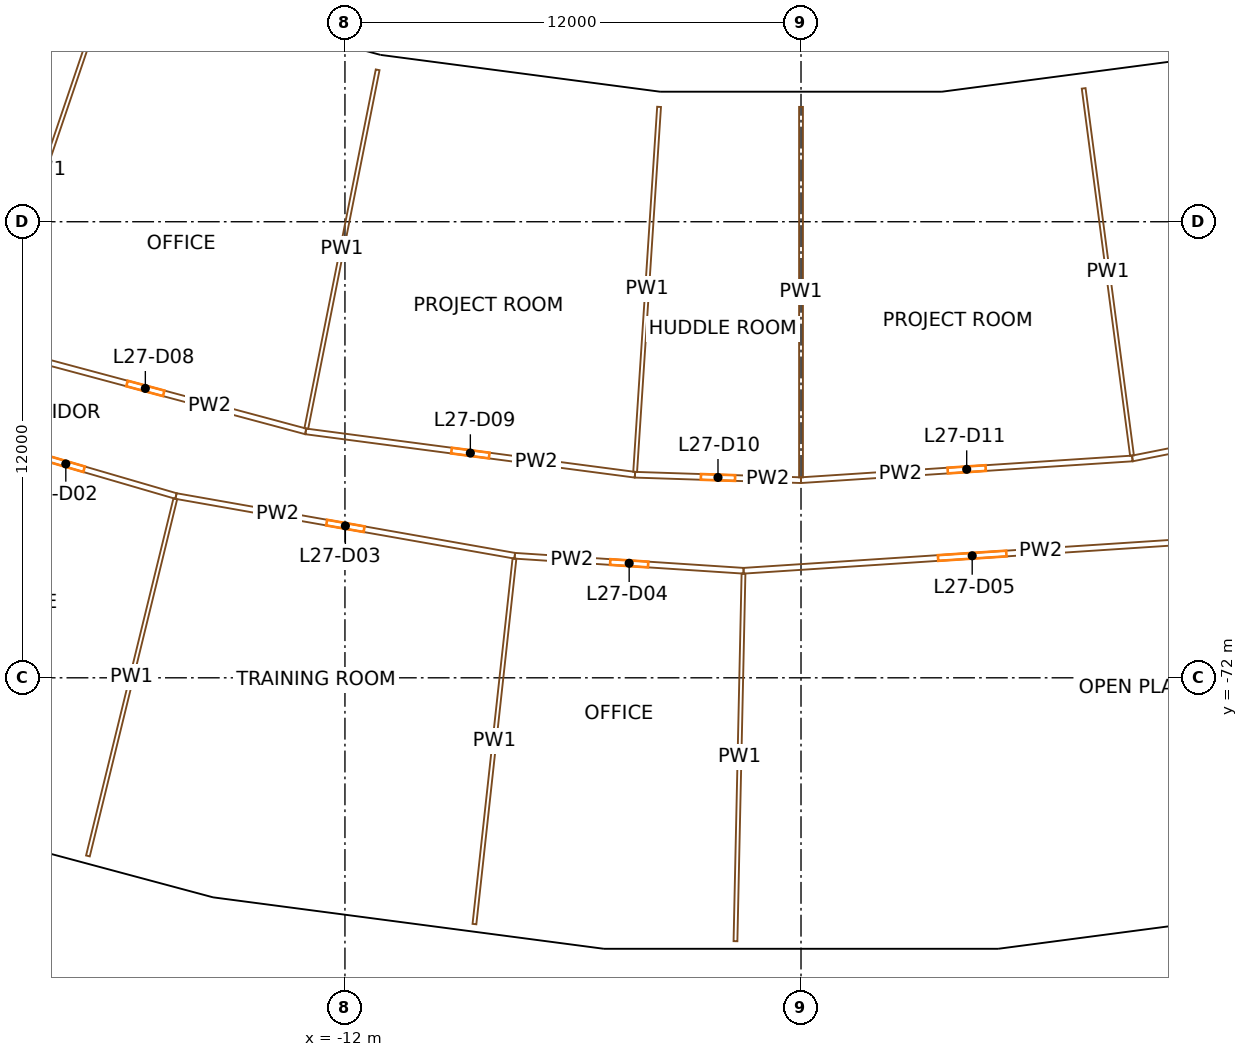
"""IFC4 building model, lengths in metres.
Left out: names, types, materials, properties, quantities, classifications, styles, units other than length and angle.
Written with IfcOpenShell. Run it as: python <this file> out.ifc"""

import sys

from ifc_helpers import new_model, si_unit, direction, frame, frame_2d, origin, origin_2d, place, context, subcontext, project, spatial, rectangle, extrude, element, fill, save


model = new_model("IFC4")
c1 = context("Model", 3, precision=1e-05, world=origin(), true_north=direction((0.0, 1.0)))
c2 = subcontext(c1, "Body", "Model", "MODEL_VIEW")
j1 = project(units=[si_unit("LENGTHUNIT", "METRE"), si_unit("PLANEANGLEUNIT", "RADIAN")], contexts=[c1])
p1 = place(None, origin())
s1 = spatial("IfcSite", under=j1, at=p1, CompositionType="ELEMENT")
p2 = place(p1, origin())
s2 = spatial("IfcBuilding", under=s1, at=p2, CompositionType="ELEMENT")
p3 = place(p2, frame((0.0, 0.0, 121.5)))
s3 = spatial("IfcBuildingStorey", under=s2, at=p3, CompositionType="ELEMENT", Elevation=121.5)
for number, where, z_axis, x_axis in (
    (1, (-18.724, -55.159, 0.0), (0.0, 0.0, 1.0), (0.947, -0.321, 0.0)),
    (2, (-11.364, -57.131, 0.0), (0.0, 0.0, 1.0), (0.981, -0.195, 0.0)),
    (3, (-15.168, -76.256, 0.0), (0.0, 0.0, 1.0), (0.981, -0.195, 0.0)),
    (4, (-3.81, -58.125, 0.0), (0.0, 0.0, 1.0), (0.998, -0.065, 0.0)),
    (5, (-5.085, -77.583, 0.0), (0.0, 0.0, 1.0), (0.998, -0.065, 0.0)),
    (6, (3.81, -58.125, 0.0), (0.0, 0.0, 1.0), (0.998, 0.065, 0.0)),
    (7, (5.085, -77.583, 0.0), (0.0, 0.0, 1.0), (0.998, 0.065, 0.0)),
):
    element("IfcColumn", number, at=place(p3, frame(where, z_axis=z_axis, x_axis=x_axis)), inside=s3, PredefinedType="COLUMN", context=c2, shape_type="SweptSolid", body=[
        extrude(rectangle(XDim=1.2, YDim=1.5, at=origin_2d()), origin(), (0.0, 0.0, 1.0), 3.8),
    ])
p4 = place(p3, frame((11.125, -55.804, 0.0), z_axis=(0.0, 0.0, 1.0), x_axis=(-0.991444533306, -0.130528684121, 0.0)))
e8 = element("IfcWall", 8, at=p4, inside=s3, PredefinedType="SOLIDWALL", context=c2, shape_type="SweptSolid", body=[
    extrude(rectangle(XDim=7.493, YDim=0.4, at=frame_2d((3.747, 0.0))), origin(), (0.0, 0.0, 1.0), 2.7),
])
p5 = place(p4, frame((4.301, 0.0, 0.9)))
e9 = element("IfcOpeningElement", 9, at=p5, cuts=e8, PredefinedType="OPENING", context=c2, shape_type="SweptSolid", body=[
    extrude(rectangle(XDim=2.6, YDim=1.65, at=frame_2d((1.3, 0.825))), frame((0.0, 0.21, 0.0), z_axis=(0.0, -1.0, 0.0), x_axis=(1.0, 0.0, 0.0)), (0.0, 0.0, 1.0), 0.42),
])
p6 = place(p4, frame((0.592, 0.0, 0.9)))
e10 = element("IfcOpeningElement", 10, at=p6, cuts=e8, PredefinedType="OPENING", context=c2, shape_type="SweptSolid", body=[
    extrude(rectangle(XDim=2.6, YDim=1.65, at=frame_2d((1.3, 0.825))), frame((0.0, 0.21, 0.0), z_axis=(0.0, -1.0, 0.0), x_axis=(1.0, 0.0, 0.0)), (0.0, 0.0, 1.0), 0.42),
])
p7 = place(p3, frame((-11.15, -55.794, 0.0), z_axis=(0.0, 0.0, 1.0), x_axis=(-0.965924597867, 0.258823629594, 0.0)))
e11 = element("IfcWall", 11, at=p7, inside=s3, PredefinedType="SOLIDWALL", context=c2, shape_type="SweptSolid", body=[
    extrude(rectangle(XDim=7.342, YDim=0.4, at=frame_2d((3.671, 0.0))), origin(), (0.0, 0.0, 1.0), 2.7),
])
p8 = place(p7, frame((4.225, 0.0, 0.9)))
e12 = element("IfcOpeningElement", 12, at=p8, cuts=e11, PredefinedType="OPENING", context=c2, shape_type="SweptSolid", body=[
    extrude(rectangle(XDim=2.6, YDim=1.65, at=frame_2d((1.3, 0.825))), frame((0.0, 0.21, 0.0), z_axis=(0.0, -1.0, 0.0), x_axis=(1.0, 0.0, 0.0)), (0.0, 0.0, 1.0), 0.42),
])
p9 = place(p7, frame((0.517, 0.0, 0.9)))
e13 = element("IfcOpeningElement", 13, at=p9, cuts=e11, PredefinedType="OPENING", context=c2, shape_type="SweptSolid", body=[
    extrude(rectangle(XDim=2.6, YDim=1.65, at=frame_2d((1.3, 0.825))), frame((0.0, 0.21, 0.0), z_axis=(0.0, -1.0, 0.0), x_axis=(1.0, 0.0, 0.0)), (0.0, 0.0, 1.0), 0.42),
])
p10 = place(p3, frame((-3.697, -56.782, 0.0), z_axis=(0.0, 0.0, 1.0), x_axis=(-0.991444533306, 0.130528684121, 0.0)))
e14 = element("IfcWall", 14, at=p10, inside=s3, PredefinedType="SOLIDWALL", context=c2, shape_type="SweptSolid", body=[
    extrude(rectangle(XDim=7.493, YDim=0.4, at=frame_2d((3.747, 0.0))), origin(), (0.0, 0.0, 1.0), 2.7),
])
p11 = place(p10, frame((4.301, 0.0, 0.9)))
e15 = element("IfcOpeningElement", 15, at=p11, cuts=e14, PredefinedType="OPENING", context=c2, shape_type="SweptSolid", body=[
    extrude(rectangle(XDim=2.6, YDim=1.65, at=frame_2d((1.3, 0.825))), frame((0.0, 0.21, 0.0), z_axis=(0.0, -1.0, 0.0), x_axis=(1.0, 0.0, 0.0)), (0.0, 0.0, 1.0), 0.42),
])
p12 = place(p10, frame((0.592, 0.0, 0.9)))
e16 = element("IfcOpeningElement", 16, at=p12, cuts=e14, PredefinedType="OPENING", context=c2, shape_type="SweptSolid", body=[
    extrude(rectangle(XDim=2.6, YDim=1.65, at=frame_2d((1.3, 0.825))), frame((0.0, 0.21, 0.0), z_axis=(0.0, -1.0, 0.0), x_axis=(1.0, 0.0, 0.0)), (0.0, 0.0, 1.0), 0.42),
])
p13 = place(p3, frame((3.671, -56.779, 0.0), z_axis=(0.0, 0.0, 1.0), x_axis=(-1.0, 0.0, 0.0)))
e17 = element("IfcWall", 17, at=p13, inside=s3, PredefinedType="SOLIDWALL", context=c2, shape_type="SweptSolid", body=[
    extrude(rectangle(XDim=7.341, YDim=0.4, at=frame_2d((3.671, 0.0))), origin(), (0.0, 0.0, 1.0), 2.7),
])
p14 = place(p13, frame((4.225, 0.0, 0.9)))
e18 = element("IfcOpeningElement", 18, at=p14, cuts=e17, PredefinedType="OPENING", context=c2, shape_type="SweptSolid", body=[
    extrude(rectangle(XDim=2.6, YDim=1.65, at=frame_2d((1.3, 0.825))), frame((0.0, 0.21, 0.0), z_axis=(0.0, -1.0, 0.0), x_axis=(1.0, 0.0, 0.0)), (0.0, 0.0, 1.0), 0.42),
])
p15 = place(p13, frame((0.517, 0.0, 0.9)))
e19 = element("IfcOpeningElement", 19, at=p15, cuts=e17, PredefinedType="OPENING", context=c2, shape_type="SweptSolid", body=[
    extrude(rectangle(XDim=2.6, YDim=1.65, at=frame_2d((1.3, 0.825))), frame((0.0, 0.21, 0.0), z_axis=(0.0, -1.0, 0.0), x_axis=(1.0, 0.0, 0.0)), (0.0, 0.0, 1.0), 0.42),
])
p16 = place(p3, frame((-16.446, -67.217, 0.0), z_axis=(0.0, 0.0, 1.0), x_axis=(-0.960056580345, 0.279805937279, 0.0)))
e20 = element("IfcWall", 20, at=p16, inside=s3, PredefinedType="PARTITIONING", context=c2, shape_type="SweptSolid", body=[
    extrude(rectangle(XDim=6.039, YDim=0.15, at=frame_2d((3.02, 0.0))), origin(), (0.0, 0.0, 1.0), 2.4),
])
p17 = place(p16, frame((2.52, 0.0, 0.0)))
e21 = element("IfcOpeningElement", 21, at=p17, cuts=e20, PredefinedType="OPENING", context=c2, shape_type="SweptSolid", body=[
    extrude(rectangle(XDim=1.0, YDim=2.1, at=frame_2d((0.5, 1.05))), frame((0.0, 0.085, 0.0), z_axis=(0.0, -1.0, 0.0), x_axis=(1.0, 0.0, 0.0)), (0.0, 0.0, 1.0), 0.17),
])
p18 = place(p3, frame((-21.472, -63.255, 0.0), z_axis=(0.0, 0.0, 1.0), x_axis=(0.965927722938, -0.258811966607, 0.0)))
e22 = element("IfcWall", 22, at=p18, inside=s3, PredefinedType="PARTITIONING", context=c2, shape_type="SweptSolid", body=[
    extrude(rectangle(XDim=8.738, YDim=0.15, at=frame_2d((4.369, 0.0))), origin(), (0.0, 0.0, 1.0), 2.4),
])
p19 = place(p18, frame((3.869, 0.0, 0.0)))
e23 = element("IfcOpeningElement", 23, at=p19, cuts=e22, PredefinedType="OPENING", context=c2, shape_type="SweptSolid", body=[
    extrude(rectangle(XDim=1.0, YDim=2.1, at=frame_2d((0.5, 1.05))), frame((0.0, 0.085, 0.0), z_axis=(0.0, -1.0, 0.0), x_axis=(1.0, 0.0, 0.0)), (0.0, 0.0, 1.0), 0.17),
])
p20 = place(p3, frame((-18.763, -76.687, 0.0), z_axis=(0.0, 0.0, 1.0), x_axis=(0.237657357205, 0.971349051869, 0.0)))
e24 = element("IfcWall", 24, at=p20, inside=s3, PredefinedType="PARTITIONING", context=c2, shape_type="SweptSolid", body=[
    extrude(rectangle(XDim=9.674, YDim=0.1, at=frame_2d((4.837, 0.0))), origin(), (0.0, 0.0, 1.0), 2.4),
])
p21 = place(p3, frame((-18.354, -54.07, 0.0), z_axis=(0.0, 0.0, 1.0), x_axis=(-0.321435668314, -0.946931418391, 0.0)))
e25 = element("IfcWall", 25, at=p21, inside=s3, PredefinedType="PARTITIONING", context=c2, shape_type="SweptSolid", body=[
    extrude(rectangle(XDim=9.625, YDim=0.1, at=frame_2d((4.812, 0.0))), origin(), (0.0, 0.0, 1.0), 2.4),
])
p22 = place(p3, frame((-7.532, -68.789, 0.0), z_axis=(0.0, 0.0, 1.0), x_axis=(-0.984813412134, 0.173616080133, 0.0)))
e26 = element("IfcWall", 26, at=p22, inside=s3, PredefinedType="PARTITIONING", context=c2, shape_type="SweptSolid", body=[
    extrude(rectangle(XDim=9.052, YDim=0.15, at=frame_2d((4.526, 0.0))), origin(), (0.0, 0.0, 1.0), 2.4),
])
p23 = place(p22, frame((4.026, 0.0, 0.0)))
e27 = element("IfcOpeningElement", 27, at=p23, cuts=e26, PredefinedType="OPENING", context=c2, shape_type="SweptSolid", body=[
    extrude(rectangle(XDim=1.0, YDim=2.1, at=frame_2d((0.5, 1.05))), frame((0.0, 0.085, 0.0), z_axis=(0.0, -1.0, 0.0), x_axis=(1.0, 0.0, 0.0)), (0.0, 0.0, 1.0), 0.17),
])
p24 = place(p3, frame((-13.032, -65.516, 0.0), z_axis=(0.0, 0.0, 1.0), x_axis=(0.991443260322, -0.130538352841, 0.0)))
e28 = element("IfcWall", 28, at=p24, inside=s3, PredefinedType="PARTITIONING", context=c2, shape_type="SweptSolid", body=[
    extrude(rectangle(XDim=8.738, YDim=0.15, at=frame_2d((4.369, 0.0))), origin(), (0.0, 0.0, 1.0), 2.4),
])
p25 = place(p24, frame((3.869, 0.0, 0.0)))
e29 = element("IfcOpeningElement", 29, at=p25, cuts=e28, PredefinedType="OPENING", context=c2, shape_type="SweptSolid", body=[
    extrude(rectangle(XDim=1.0, YDim=2.1, at=frame_2d((0.5, 1.05))), frame((0.0, 0.085, 0.0), z_axis=(0.0, -1.0, 0.0), x_axis=(1.0, 0.0, 0.0)), (0.0, 0.0, 1.0), 0.17),
])
p26 = place(p3, frame((-11.14, -56.003, 0.0), z_axis=(0.0, 0.0, 1.0), x_axis=(-0.195086769421, -0.980785987052, 0.0)))
e30 = element("IfcWall", 30, at=p26, inside=s3, PredefinedType="PARTITIONING", context=c2, shape_type="SweptSolid", body=[
    extrude(rectangle(XDim=9.625, YDim=0.1, at=frame_2d((4.812, 0.0))), origin(), (0.0, 0.0, 1.0), 2.4),
])
p27 = place(p3, frame((-8.593, -78.48, 0.0), z_axis=(0.0, 0.0, 1.0), x_axis=(0.10884699726, 0.994058514972, 0.0)))
e31 = element("IfcWall", 31, at=p27, inside=s3, PredefinedType="PARTITIONING", context=c2, shape_type="SweptSolid", body=[
    extrude(rectangle(XDim=9.674, YDim=0.1, at=frame_2d((4.837, 0.0))), origin(), (0.0, 0.0, 1.0), 2.4),
])
p28 = place(p3, frame((-1.511, -69.184, 0.0), z_axis=(0.0, 0.0, 1.0), x_axis=(-0.997856905736, 0.065433903101, 0.0)))
e32 = element("IfcWall", 32, at=p28, inside=s3, PredefinedType="PARTITIONING", context=c2, shape_type="SweptSolid", body=[
    extrude(rectangle(XDim=6.033, YDim=0.15, at=frame_2d((3.017, 0.0))), origin(), (0.0, 0.0, 1.0), 2.4),
])
p29 = place(p28, frame((2.517, 0.0, 0.0)))
e33 = element("IfcOpeningElement", 33, at=p29, cuts=e32, PredefinedType="OPENING", context=c2, shape_type="SweptSolid", body=[
    extrude(rectangle(XDim=1.0, YDim=2.1, at=frame_2d((0.5, 1.05))), frame((0.0, 0.085, 0.0), z_axis=(0.0, -1.0, 0.0), x_axis=(1.0, 0.0, 0.0)), (0.0, 0.0, 1.0), 0.17),
])
p30 = place(p3, frame((-4.369, -66.657, 0.0), z_axis=(0.0, 0.0, 1.0), x_axis=(0.99946426167, -0.03272903366, 0.0)))
e34 = element("IfcWall", 34, at=p30, inside=s3, PredefinedType="PARTITIONING", context=c2, shape_type="SweptSolid", body=[
    extrude(rectangle(XDim=4.371, YDim=0.15, at=frame_2d((2.186, 0.0))), origin(), (0.0, 0.0, 1.0), 2.4),
])
p31 = place(p30, frame((1.736, 0.0, 0.0)))
e35 = element("IfcOpeningElement", 35, at=p31, cuts=e34, PredefinedType="OPENING", context=c2, shape_type="SweptSolid", body=[
    extrude(rectangle(XDim=0.9, YDim=2.1, at=frame_2d((0.45, 1.05))), frame((0.0, 0.085, 0.0), z_axis=(0.0, -1.0, 0.0), x_axis=(1.0, 0.0, 0.0)), (0.0, 0.0, 1.0), 0.17),
])
p32 = place(p3, frame((-3.735, -56.978, 0.0), z_axis=(0.0, 0.0, 1.0), x_axis=(-0.065392665599, -0.997859609006, 0.0)))
e36 = element("IfcWall", 36, at=p32, inside=s3, PredefinedType="PARTITIONING", context=c2, shape_type="SweptSolid", body=[
    extrude(rectangle(XDim=9.625, YDim=0.1, at=frame_2d((4.812, 0.0))), origin(), (0.0, 0.0, 1.0), 2.4),
])
p33 = place(p3, frame((-1.724, -78.93, 0.0), z_axis=(0.0, 0.0, 1.0), x_axis=(0.021829960086, 0.999761698027, 0.0)))
e37 = element("IfcWall", 37, at=p33, inside=s3, PredefinedType="PARTITIONING", context=c2, shape_type="SweptSolid", body=[
    extrude(rectangle(XDim=9.674, YDim=0.1, at=frame_2d((4.837, 0.0))), origin(), (0.0, 0.0, 1.0), 2.4),
])
p34 = place(p3, frame((10.52, -68.395, 0.0), z_axis=(0.0, 0.0, 1.0), x_axis=(-0.997857664211, -0.065422335445, 0.0)))
e38 = element("IfcWall", 38, at=p34, inside=s3, PredefinedType="PARTITIONING", context=c2, shape_type="SweptSolid", body=[
    extrude(rectangle(XDim=12.057, YDim=0.15, at=frame_2d((6.029, 0.0))), origin(), (0.0, 0.0, 1.0), 2.4),
])
p35 = place(p34, frame((5.129, 0.0, 0.0)))
e39 = element("IfcOpeningElement", 39, at=p35, cuts=e38, PredefinedType="OPENING", context=c2, shape_type="SweptSolid", body=[
    extrude(rectangle(XDim=1.8, YDim=2.1, at=frame_2d((0.9, 1.05))), frame((0.0, 0.085, 0.0), z_axis=(0.0, -1.0, 0.0), x_axis=(1.0, 0.0, 0.0)), (0.0, 0.0, 1.0), 0.17),
])
p36 = place(p3, frame((0.0, -66.8, 0.0), z_axis=(0.0, 0.0, 1.0), x_axis=(0.997858593599, 0.065408158359, 0.0)))
e40 = element("IfcWall", 40, at=p36, inside=s3, PredefinedType="PARTITIONING", context=c2, shape_type="SweptSolid", body=[
    extrude(rectangle(XDim=8.738, YDim=0.15, at=frame_2d((4.369, 0.0))), origin(), (0.0, 0.0, 1.0), 2.4),
])
p37 = place(p36, frame((3.869, 0.0, 0.0)))
e41 = element("IfcOpeningElement", 41, at=p37, cuts=e40, PredefinedType="OPENING", context=c2, shape_type="SweptSolid", body=[
    extrude(rectangle(XDim=1.0, YDim=2.1, at=frame_2d((0.5, 1.05))), frame((0.0, 0.085, 0.0), z_axis=(0.0, -1.0, 0.0), x_axis=(1.0, 0.0, 0.0)), (0.0, 0.0, 1.0), 0.17),
])
p38 = place(p3, frame((0.0, -56.979, 0.0), z_axis=(0.0, 0.0, 1.0), x_axis=(0.0, -1.0, 0.0)))
e42 = element("IfcWall", 42, at=p38, inside=s3, PredefinedType="PARTITIONING", context=c2, shape_type="SweptSolid", body=[
    extrude(rectangle(XDim=9.747, YDim=0.1, at=frame_2d((4.873, 0.0))), origin(), (0.0, 0.0, 1.0), 2.4),
])
p39 = place(p3, frame((7.437, -56.491, 0.0), z_axis=(0.0, 0.0, 1.0), x_axis=(0.13053421433, -0.99144380521, 0.0)))
e43 = element("IfcWall", 43, at=p39, inside=s3, PredefinedType="PARTITIONING", context=c2, shape_type="SweptSolid", body=[
    extrude(rectangle(XDim=9.746, YDim=0.1, at=frame_2d((4.873, 0.0))), origin(), (0.0, 0.0, 1.0), 2.4),
])
p40 = place(p3, frame((8.719, -66.229, 0.0), z_axis=(0.0, 0.0, 1.0), x_axis=(0.980787736115, 0.195077975915, 0.0)))
e44 = element("IfcWall", 44, at=p40, inside=s3, PredefinedType="PARTITIONING", context=c2, shape_type="SweptSolid", body=[
    extrude(rectangle(XDim=8.729, YDim=0.15, at=frame_2d((4.365, 0.0))), origin(), (0.0, 0.0, 1.0), 2.4),
])
p41 = place(p9, origin())
e45 = element("IfcWindow", 45, at=p41, inside=s3, PartitioningType="SINGLE_PANEL", PredefinedType="WINDOW", context=c2, shape_type="SweptSolid", body=[
    extrude(rectangle(XDim=2.6, YDim=1.65, at=frame_2d((1.3, 0.825))), frame((0.0, 0.03, 0.0), z_axis=(0.0, -1.0, 0.0), x_axis=(1.0, 0.0, 0.0)), (0.0, 0.0, 1.0), 0.06),
])
fill(e13, e45)
p42 = place(p11, origin())
e46 = element("IfcWindow", 46, at=p42, inside=s3, PartitioningType="SINGLE_PANEL", PredefinedType="WINDOW", context=c2, shape_type="SweptSolid", body=[
    extrude(rectangle(XDim=2.6, YDim=1.65, at=frame_2d((1.3, 0.825))), frame((0.0, 0.03, 0.0), z_axis=(0.0, -1.0, 0.0), x_axis=(1.0, 0.0, 0.0)), (0.0, 0.0, 1.0), 0.06),
])
fill(e15, e46)
p43 = place(p12, origin())
e47 = element("IfcWindow", 47, at=p43, inside=s3, PartitioningType="SINGLE_PANEL", PredefinedType="WINDOW", context=c2, shape_type="SweptSolid", body=[
    extrude(rectangle(XDim=2.6, YDim=1.65, at=frame_2d((1.3, 0.825))), frame((0.0, 0.03, 0.0), z_axis=(0.0, -1.0, 0.0), x_axis=(1.0, 0.0, 0.0)), (0.0, 0.0, 1.0), 0.06),
])
fill(e16, e47)
p44 = place(p14, origin())
e48 = element("IfcWindow", 48, at=p44, inside=s3, PartitioningType="SINGLE_PANEL", PredefinedType="WINDOW", context=c2, shape_type="SweptSolid", body=[
    extrude(rectangle(XDim=2.6, YDim=1.65, at=frame_2d((1.3, 0.825))), frame((0.0, 0.03, 0.0), z_axis=(0.0, -1.0, 0.0), x_axis=(1.0, 0.0, 0.0)), (0.0, 0.0, 1.0), 0.06),
])
fill(e18, e48)
p45 = place(p15, origin())
e49 = element("IfcWindow", 49, at=p45, inside=s3, PartitioningType="SINGLE_PANEL", PredefinedType="WINDOW", context=c2, shape_type="SweptSolid", body=[
    extrude(rectangle(XDim=2.6, YDim=1.65, at=frame_2d((1.3, 0.825))), frame((0.0, 0.03, 0.0), z_axis=(0.0, -1.0, 0.0), x_axis=(1.0, 0.0, 0.0)), (0.0, 0.0, 1.0), 0.06),
])
fill(e19, e49)
p46 = place(p5, origin())
e50 = element("IfcWindow", 50, at=p46, inside=s3, PartitioningType="SINGLE_PANEL", PredefinedType="WINDOW", context=c2, shape_type="SweptSolid", body=[
    extrude(rectangle(XDim=2.6, YDim=1.65, at=frame_2d((1.3, 0.825))), frame((0.0, 0.03, 0.0), z_axis=(0.0, -1.0, 0.0), x_axis=(1.0, 0.0, 0.0)), (0.0, 0.0, 1.0), 0.06),
])
fill(e9, e50)
p47 = place(p6, origin())
e51 = element("IfcWindow", 51, at=p47, inside=s3, PartitioningType="SINGLE_PANEL", PredefinedType="WINDOW", context=c2, shape_type="SweptSolid", body=[
    extrude(rectangle(XDim=2.6, YDim=1.65, at=frame_2d((1.3, 0.825))), frame((0.0, 0.03, 0.0), z_axis=(0.0, -1.0, 0.0), x_axis=(1.0, 0.0, 0.0)), (0.0, 0.0, 1.0), 0.06),
])
fill(e10, e51)
p48 = place(p17, origin())
e52 = element("IfcDoor", 52, at=p48, inside=s3, OperationType="SINGLE_SWING_RIGHT", PredefinedType="DOOR", context=c2, shape_type="SweptSolid", body=[
    extrude(rectangle(XDim=1.0, YDim=2.1, at=frame_2d((0.5, 1.05))), frame((0.0, 0.025, 0.0), z_axis=(0.0, -1.0, 0.0), x_axis=(1.0, 0.0, 0.0)), (0.0, 0.0, 1.0), 0.05),
])
fill(e21, e52)
p49 = place(p23, origin())
e53 = element("IfcDoor", 53, at=p49, inside=s3, OperationType="SINGLE_SWING_RIGHT", PredefinedType="DOOR", context=c2, shape_type="SweptSolid", body=[
    extrude(rectangle(XDim=1.0, YDim=2.1, at=frame_2d((0.5, 1.05))), frame((0.0, 0.025, 0.0), z_axis=(0.0, -1.0, 0.0), x_axis=(1.0, 0.0, 0.0)), (0.0, 0.0, 1.0), 0.05),
])
fill(e27, e53)
p50 = place(p29, origin())
e54 = element("IfcDoor", 54, at=p50, inside=s3, OperationType="SINGLE_SWING_RIGHT", PredefinedType="DOOR", context=c2, shape_type="SweptSolid", body=[
    extrude(rectangle(XDim=1.0, YDim=2.1, at=frame_2d((0.5, 1.05))), frame((0.0, 0.025, 0.0), z_axis=(0.0, -1.0, 0.0), x_axis=(1.0, 0.0, 0.0)), (0.0, 0.0, 1.0), 0.05),
])
fill(e33, e54)
p51 = place(p35, origin())
e55 = element("IfcDoor", 55, at=p51, inside=s3, OperationType="DOUBLE_DOOR_SINGLE_SWING", PredefinedType="DOOR", context=c2, shape_type="SweptSolid", body=[
    extrude(rectangle(XDim=1.8, YDim=2.1, at=frame_2d((0.9, 1.05))), frame((0.0, 0.025, 0.0), z_axis=(0.0, -1.0, 0.0), x_axis=(1.0, 0.0, 0.0)), (0.0, 0.0, 1.0), 0.05),
])
fill(e39, e55)
p52 = place(p19, origin())
e56 = element("IfcDoor", 56, at=p52, inside=s3, OperationType="SINGLE_SWING_RIGHT", PredefinedType="DOOR", context=c2, shape_type="SweptSolid", body=[
    extrude(rectangle(XDim=1.0, YDim=2.1, at=frame_2d((0.5, 1.05))), frame((0.0, 0.025, 0.0), z_axis=(0.0, -1.0, 0.0), x_axis=(1.0, 0.0, 0.0)), (0.0, 0.0, 1.0), 0.05),
])
fill(e23, e56)
p53 = place(p25, origin())
e57 = element("IfcDoor", 57, at=p53, inside=s3, OperationType="SINGLE_SWING_RIGHT", PredefinedType="DOOR", context=c2, shape_type="SweptSolid", body=[
    extrude(rectangle(XDim=1.0, YDim=2.1, at=frame_2d((0.5, 1.05))), frame((0.0, 0.025, 0.0), z_axis=(0.0, -1.0, 0.0), x_axis=(1.0, 0.0, 0.0)), (0.0, 0.0, 1.0), 0.05),
])
fill(e29, e57)
p54 = place(p31, origin())
e58 = element("IfcDoor", 58, at=p54, inside=s3, OperationType="SINGLE_SWING_RIGHT", PredefinedType="DOOR", context=c2, shape_type="SweptSolid", body=[
    extrude(rectangle(XDim=0.9, YDim=2.1, at=frame_2d((0.45, 1.05))), frame((0.0, 0.025, 0.0), z_axis=(0.0, -1.0, 0.0), x_axis=(1.0, 0.0, 0.0)), (0.0, 0.0, 1.0), 0.05),
])
fill(e35, e58)
p55 = place(p37, origin())
e59 = element("IfcDoor", 59, at=p55, inside=s3, OperationType="SINGLE_SWING_RIGHT", PredefinedType="DOOR", context=c2, shape_type="SweptSolid", body=[
    extrude(rectangle(XDim=1.0, YDim=2.1, at=frame_2d((0.5, 1.05))), frame((0.0, 0.025, 0.0), z_axis=(0.0, -1.0, 0.0), x_axis=(1.0, 0.0, 0.0)), (0.0, 0.0, 1.0), 0.05),
])
fill(e41, e59)
save(model, sys.argv[1])
